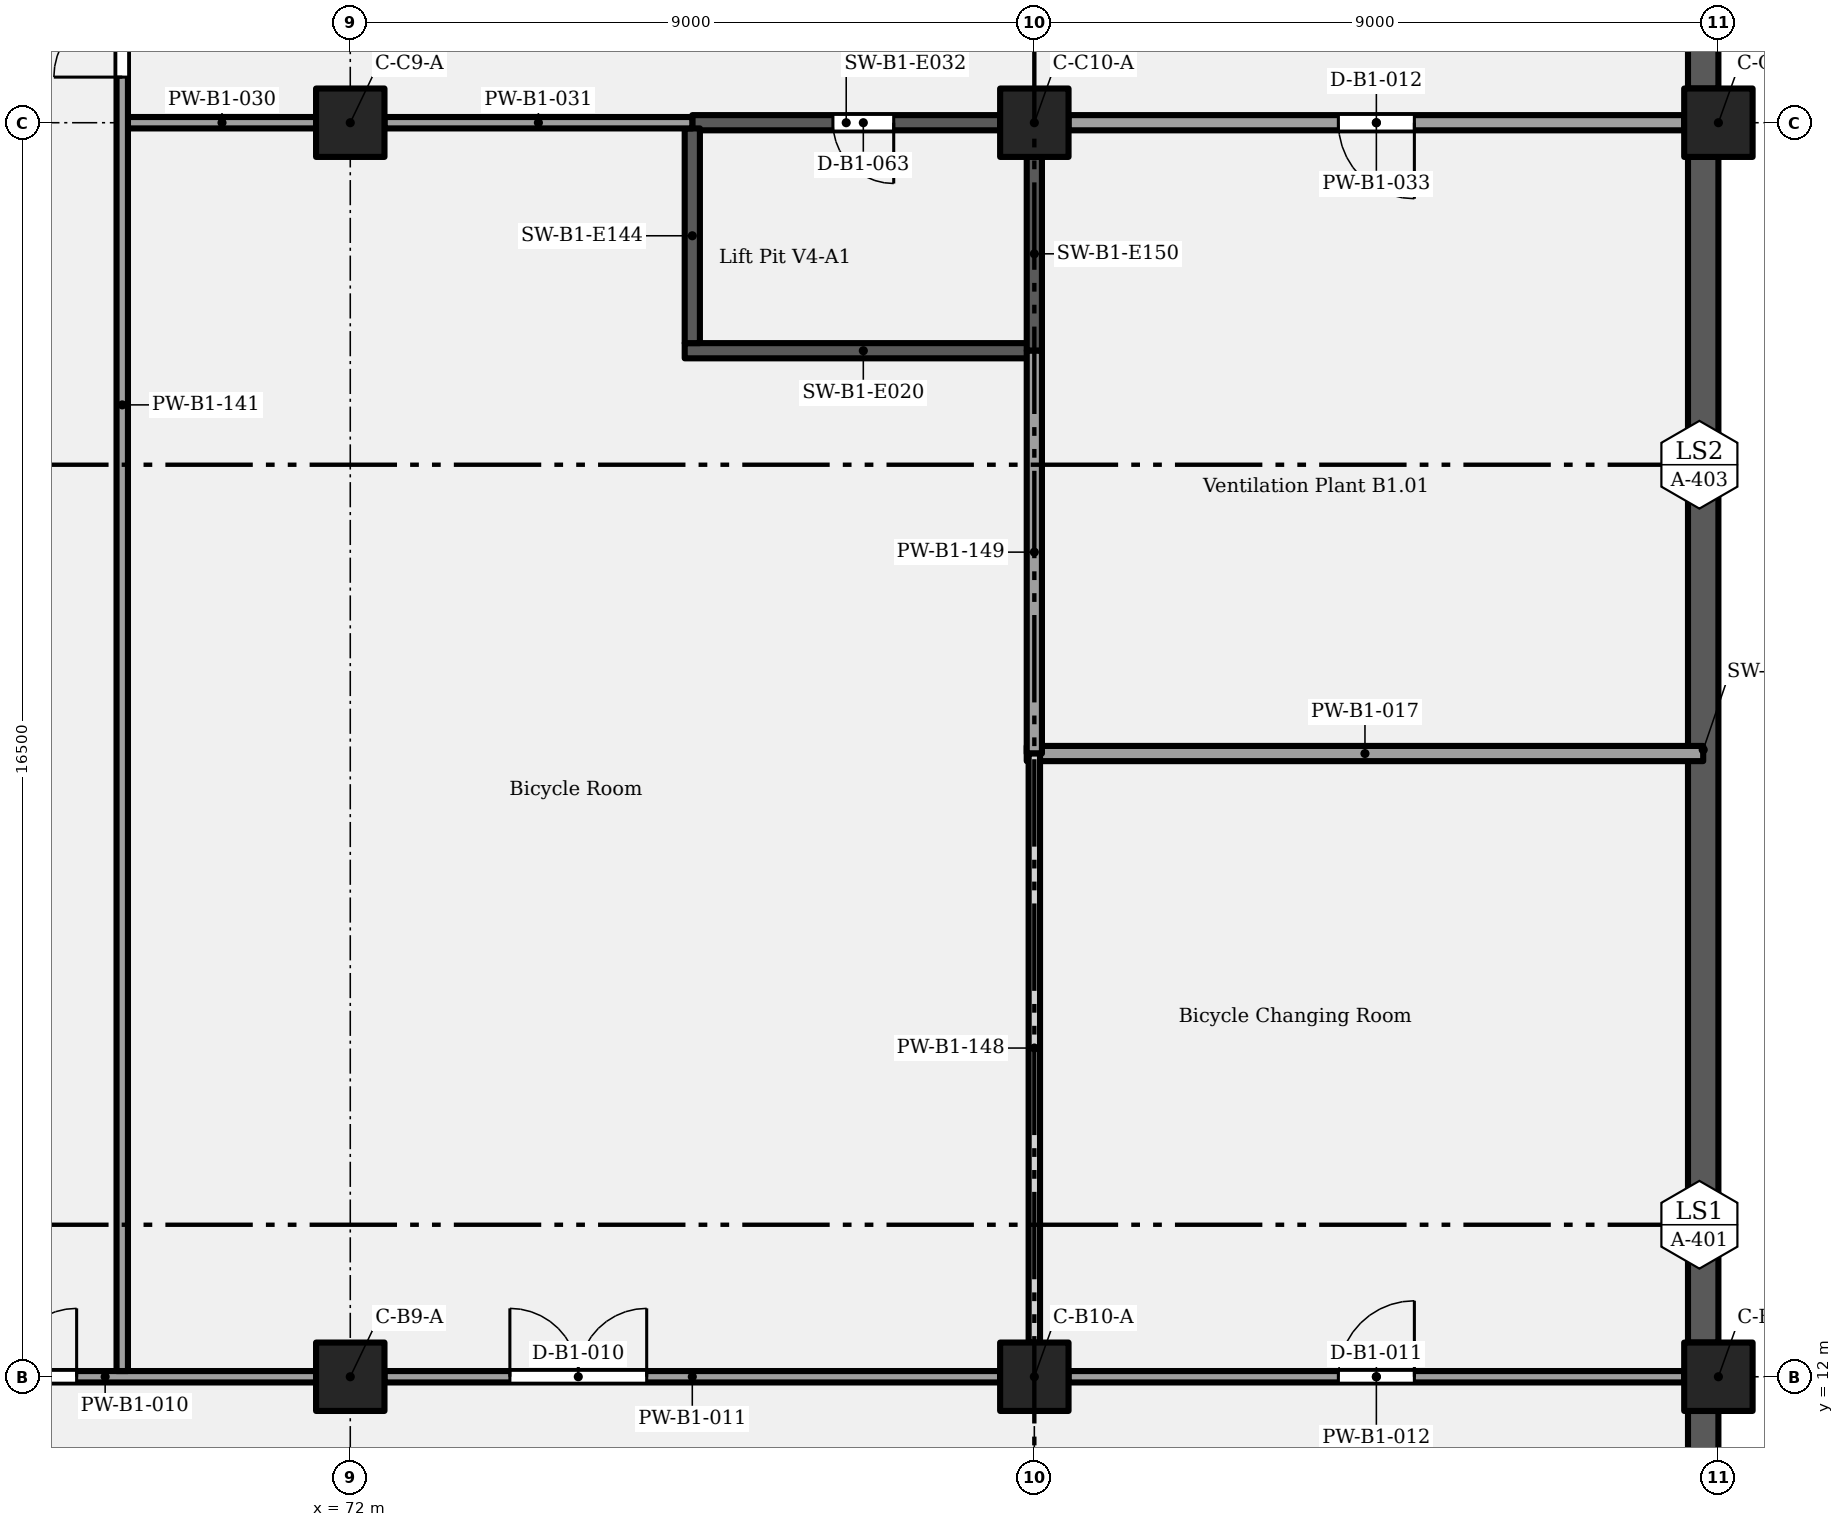
"""IFC4 building model, lengths in metres.
Left out: names, types, materials, properties, quantities, classifications, styles, units other than length and angle.
Written with IfcOpenShell. Run it as: python <this file> out.ifc"""

import sys

from ifc_helpers import new_model, si_unit, direction, frame, frame_2d, origin, origin_2d, place, context, subcontext, project, spatial, rectangle, extrude, element, fill, save


model = new_model("IFC4")
c1 = context("Model", 3, precision=1e-05, world=origin(), true_north=direction((0.0, 1.0)))
c2 = subcontext(c1, "Body", "Model", "MODEL_VIEW")
j1 = project(units=[si_unit("LENGTHUNIT", "METRE"), si_unit("PLANEANGLEUNIT", "RADIAN")], contexts=[c1])
p1 = place(None, origin())
s1 = spatial("IfcSite", under=j1, at=p1, CompositionType="ELEMENT")
p2 = place(p1, origin())
s2 = spatial("IfcBuilding", under=s1, at=p2, CompositionType="ELEMENT")
p3 = place(p2, frame((0.0, 0.0, -4.2)))
s3 = spatial("IfcBuildingStorey", under=s2, at=p3, CompositionType="ELEMENT", Elevation=-4.2)
for number, where, z_axis, x_axis in (
    (1, (72.0, 12.0, 0.0), (0.0, 0.0, 1.0), (1.0, 0.0, 0.0)),
    (2, (81.0, 12.0, 0.0), (0.0, 0.0, 1.0), (1.0, 0.0, 0.0)),
    (3, (90.0, 12.0, 0.0), (0.0, 0.0, 1.0), (1.0, 0.0, 0.0)),
    (4, (72.0, 28.5, 0.0), (0.0, 0.0, 1.0), (1.0, 0.0, 0.0)),
    (5, (81.0, 28.5, 0.0), (0.0, 0.0, 1.0), (1.0, 0.0, 0.0)),
    (6, (90.0, 28.5, 0.0), (0.0, 0.0, 1.0), (1.0, 0.0, 0.0)),
):
    element("IfcColumn", number, at=place(p3, frame(where, z_axis=z_axis, x_axis=x_axis)), inside=s3, PredefinedType="COLUMN", context=c2, shape_type="SweptSolid", body=[
        extrude(rectangle(XDim=0.9, YDim=0.9, at=origin_2d()), origin(), (0.0, 0.0, 1.0), 4.2),
    ])
p4 = place(p3, frame((89.8, 0.45, 0.0), z_axis=(0.0, 0.0, 1.0), x_axis=(0.0, 1.0, 0.0)))
e7 = element("IfcWall", 7, at=p4, inside=s3, PredefinedType="SOLIDWALL", context=c2, shape_type="SweptSolid", body=[
    extrude(rectangle(XDim=11.1, YDim=0.4, at=frame_2d((5.55, 0.0))), origin(), (0.0, 0.0, 1.0), 3.9),
])
p5 = place(p3, frame((89.8, 12.45, 0.0), z_axis=(0.0, 0.0, 1.0), x_axis=(0.0, 1.0, 0.0)))
e8 = element("IfcWall", 8, at=p5, inside=s3, PredefinedType="SOLIDWALL", context=c2, shape_type="SweptSolid", body=[
    extrude(rectangle(XDim=15.6, YDim=0.4, at=frame_2d((7.8, 0.0))), origin(), (0.0, 0.0, 1.0), 3.9),
])
p6 = place(p3, frame((89.8, 28.95, 0.0), z_axis=(0.0, 0.0, 1.0), x_axis=(0.0, 1.0, 0.0)))
e9 = element("IfcWall", 9, at=p6, inside=s3, PredefinedType="SOLIDWALL", context=c2, shape_type="SweptSolid", body=[
    extrude(rectangle(XDim=8.1, YDim=0.4, at=frame_2d((4.05, 0.0))), origin(), (0.0, 0.0, 1.0), 3.9),
])
p7 = place(p3, frame((66.0, 12.0, 0.0), z_axis=(0.0, 0.0, 1.0), x_axis=(1.0, 0.0, 0.0)))
e10 = element("IfcWall", 10, at=p7, inside=s3, PredefinedType="PARTITIONING", context=c2, shape_type="SweptSolid", body=[
    extrude(rectangle(XDim=5.55, YDim=0.15, at=frame_2d((2.775, 0.0))), origin(), (0.0, 0.0, 1.0), 3.15),
])
p8 = place(p7, frame((0.6, 0.0, 0.0)))
e11 = element("IfcOpeningElement", 11, at=p8, cuts=e10, PredefinedType="OPENING", context=c2, shape_type="SweptSolid", body=[
    extrude(rectangle(XDim=1.8, YDim=2.1, at=frame_2d((0.9, 1.05))), frame((0.0, 0.085, 0.0), z_axis=(0.0, -1.0, 0.0), x_axis=(1.0, 0.0, 0.0)), (0.0, 0.0, 1.0), 0.17),
])
p9 = place(p3, frame((72.45, 12.0, 0.0), z_axis=(0.0, 0.0, 1.0), x_axis=(1.0, 0.0, 0.0)))
e12 = element("IfcWall", 12, at=p9, inside=s3, PredefinedType="PARTITIONING", context=c2, shape_type="SweptSolid", body=[
    extrude(rectangle(XDim=8.1, YDim=0.15, at=frame_2d((4.05, 0.0))), origin(), (0.0, 0.0, 1.0), 3.15),
])
p10 = place(p9, frame((1.65, 0.0, 0.0)))
e13 = element("IfcOpeningElement", 13, at=p10, cuts=e12, PredefinedType="OPENING", context=c2, shape_type="SweptSolid", body=[
    extrude(rectangle(XDim=1.8, YDim=2.1, at=frame_2d((0.9, 1.05))), frame((0.0, 0.085, 0.0), z_axis=(0.0, -1.0, 0.0), x_axis=(1.0, 0.0, 0.0)), (0.0, 0.0, 1.0), 0.17),
])
p11 = place(p3, frame((81.45, 12.0, 0.0), z_axis=(0.0, 0.0, 1.0), x_axis=(1.0, 0.0, 0.0)))
e14 = element("IfcWall", 14, at=p11, inside=s3, PredefinedType="PARTITIONING", context=c2, shape_type="SweptSolid", body=[
    extrude(rectangle(XDim=8.1, YDim=0.15, at=frame_2d((4.05, 0.0))), origin(), (0.0, 0.0, 1.0), 3.15),
])
p12 = place(p11, frame((3.55, 0.0, 0.0)))
e15 = element("IfcOpeningElement", 15, at=p12, cuts=e14, PredefinedType="OPENING", context=c2, shape_type="SweptSolid", body=[
    extrude(rectangle(XDim=1.0, YDim=2.1, at=frame_2d((0.5, 1.05))), frame((0.0, 0.085, 0.0), z_axis=(0.0, -1.0, 0.0), x_axis=(1.0, 0.0, 0.0)), (0.0, 0.0, 1.0), 0.17),
])
p13 = place(p3, frame((80.9, 20.2, 0.0), z_axis=(0.0, 0.0, 1.0), x_axis=(1.0, 0.0, 0.0)))
e16 = element("IfcWall", 16, at=p13, inside=s3, PredefinedType="PARTITIONING", context=c2, shape_type="SweptSolid", body=[
    extrude(rectangle(XDim=8.9, YDim=0.2, at=frame_2d((4.45, 0.0))), origin(), (0.0, 0.0, 1.0), 3.9),
])
p14 = place(p3, frame((76.4, 25.5, 0.0), z_axis=(0.0, 0.0, 1.0), x_axis=(1.0, 0.0, 0.0)))
e17 = element("IfcWall", 17, at=p14, inside=s3, PredefinedType="SHEAR", context=c2, shape_type="SweptSolid", body=[
    extrude(rectangle(XDim=4.7, YDim=0.2, at=frame_2d((2.35, 0.0))), origin(), (0.0, 0.0, 1.0), 3.9),
])
p15 = place(p3, frame((69.075, 28.5, 0.0), z_axis=(0.0, 0.0, 1.0), x_axis=(1.0, 0.0, 0.0)))
e18 = element("IfcWall", 18, at=p15, inside=s3, PredefinedType="PARTITIONING", context=c2, shape_type="SweptSolid", body=[
    extrude(rectangle(XDim=2.475, YDim=0.15, at=frame_2d((1.238, 0.0))), origin(), (0.0, 0.0, 1.0), 3.15),
])
p16 = place(p3, frame((72.45, 28.5, 0.0), z_axis=(0.0, 0.0, 1.0), x_axis=(1.0, 0.0, 0.0)))
e19 = element("IfcWall", 19, at=p16, inside=s3, PredefinedType="PARTITIONING", context=c2, shape_type="SweptSolid", body=[
    extrude(rectangle(XDim=4.05, YDim=0.15, at=frame_2d((2.025, 0.0))), origin(), (0.0, 0.0, 1.0), 3.15),
])
p17 = place(p3, frame((76.5, 28.5, 0.0), z_axis=(0.0, 0.0, 1.0), x_axis=(1.0, 0.0, 0.0)))
e20 = element("IfcWall", 20, at=p17, inside=s3, PredefinedType="SHEAR", context=c2, shape_type="SweptSolid", body=[
    extrude(rectangle(XDim=4.05, YDim=0.2, at=frame_2d((2.025, 0.0))), origin(), (0.0, 0.0, 1.0), 3.9),
])
p18 = place(p17, frame((2.65, 0.0, 0.0), z_axis=(0.0, 0.0, 1.0), x_axis=(-1.0, 0.0, 0.0)))
e21 = element("IfcOpeningElement", 21, at=p18, cuts=e20, PredefinedType="OPENING", context=c2, shape_type="SweptSolid", body=[
    extrude(rectangle(XDim=0.8, YDim=2.0, at=frame_2d((0.4, 1.0))), frame((0.0, 0.11, 0.0), z_axis=(0.0, -1.0, 0.0), x_axis=(1.0, 0.0, 0.0)), (0.0, 0.0, 1.0), 0.22),
])
p19 = place(p3, frame((81.45, 28.5, 0.0), z_axis=(0.0, 0.0, 1.0), x_axis=(1.0, 0.0, 0.0)))
e22 = element("IfcWall", 22, at=p19, inside=s3, PredefinedType="PARTITIONING", context=c2, shape_type="SweptSolid", body=[
    extrude(rectangle(XDim=8.1, YDim=0.2, at=frame_2d((4.05, 0.0))), origin(), (0.0, 0.0, 1.0), 3.15),
])
p20 = place(p19, frame((4.55, 0.0, 0.0), z_axis=(0.0, 0.0, 1.0), x_axis=(-1.0, 0.0, 0.0)))
e23 = element("IfcOpeningElement", 23, at=p20, cuts=e22, PredefinedType="OPENING", context=c2, shape_type="SweptSolid", body=[
    extrude(rectangle(XDim=1.0, YDim=2.1, at=frame_2d((0.5, 1.05))), frame((0.0, 0.11, 0.0), z_axis=(0.0, -1.0, 0.0), x_axis=(1.0, 0.0, 0.0)), (0.0, 0.0, 1.0), 0.22),
])
p21 = place(p3, frame((69.0, 12.075, 0.0), z_axis=(0.0, 0.0, 1.0), x_axis=(0.0, 1.0, 0.0)))
e24 = element("IfcWall", 24, at=p21, inside=s3, PredefinedType="PARTITIONING", context=c2, shape_type="SweptSolid", body=[
    extrude(rectangle(XDim=25.425, YDim=0.15, at=frame_2d((12.712, 0.0))), origin(), (0.0, 0.0, 1.0), 3.9),
])
p22 = place(p21, frame((17.025, 0.0, 0.0)))
e25 = element("IfcOpeningElement", 25, at=p22, cuts=e24, PredefinedType="OPENING", context=c2, shape_type="SweptSolid", body=[
    extrude(rectangle(XDim=1.8, YDim=2.1, at=frame_2d((0.9, 1.05))), frame((0.0, 0.085, 0.0), z_axis=(0.0, -1.0, 0.0), x_axis=(1.0, 0.0, 0.0)), (0.0, 0.0, 1.0), 0.17),
])
p23 = place(p3, frame((76.5, 25.6, 0.0), z_axis=(0.0, 0.0, 1.0), x_axis=(0.0, 1.0, 0.0)))
e26 = element("IfcWall", 26, at=p23, inside=s3, PredefinedType="SHEAR", context=c2, shape_type="SweptSolid", body=[
    extrude(rectangle(XDim=2.825, YDim=0.2, at=frame_2d((1.413, 0.0))), origin(), (0.0, 0.0, 1.0), 3.9),
])
p24 = place(p3, frame((81.0, 12.45, 0.0), z_axis=(0.0, 0.0, 1.0), x_axis=(0.0, 1.0, 0.0)))
e27 = element("IfcWall", 27, at=p24, inside=s3, PredefinedType="PARTITIONING", context=c2, shape_type="SweptSolid", body=[
    extrude(rectangle(XDim=7.75, YDim=0.15, at=frame_2d((3.875, 0.0))), origin(), (0.0, 0.0, 1.0), 2.95),
])
p25 = place(p3, frame((81.0, 20.2, 0.0), z_axis=(0.0, 0.0, 1.0), x_axis=(0.0, 1.0, 0.0)))
e28 = element("IfcWall", 28, at=p25, inside=s3, PredefinedType="PARTITIONING", context=c2, shape_type="SweptSolid", body=[
    extrude(rectangle(XDim=5.3, YDim=0.2, at=frame_2d((2.65, 0.0))), origin(), (0.0, 0.0, 1.0), 2.95),
])
p26 = place(p3, frame((81.0, 25.5, 0.0), z_axis=(0.0, 0.0, 1.0), x_axis=(0.0, 1.0, 0.0)))
e29 = element("IfcWall", 29, at=p26, inside=s3, PredefinedType="SHEAR", context=c2, shape_type="SweptSolid", body=[
    extrude(rectangle(XDim=2.55, YDim=0.2, at=frame_2d((1.275, 0.0))), origin(), (0.0, 0.0, 1.0), 3.9),
])
p27 = place(p8, origin())
e30 = element("IfcDoor", 30, at=p27, inside=s3, OperationType="DOUBLE_DOOR_SINGLE_SWING", PredefinedType="DOOR", context=c2, shape_type="SweptSolid", body=[
    extrude(rectangle(XDim=1.8, YDim=2.1, at=frame_2d((0.9, 1.05))), frame((0.0, 0.025, 0.0), z_axis=(0.0, -1.0, 0.0), x_axis=(1.0, 0.0, 0.0)), (0.0, 0.0, 1.0), 0.05),
])
fill(e11, e30)
p28 = place(p22, origin())
e31 = element("IfcDoor", 31, at=p28, inside=s3, OperationType="DOUBLE_DOOR_SINGLE_SWING", PredefinedType="DOOR", context=c2, shape_type="SweptSolid", body=[
    extrude(rectangle(XDim=1.8, YDim=2.1, at=frame_2d((0.9, 1.05))), frame((0.0, 0.025, 0.0), z_axis=(0.0, -1.0, 0.0), x_axis=(1.0, 0.0, 0.0)), (0.0, 0.0, 1.0), 0.05),
])
fill(e25, e31)
p29 = place(p10, origin())
e32 = element("IfcDoor", 32, at=p29, inside=s3, OperationType="DOUBLE_DOOR_SINGLE_SWING", PredefinedType="DOOR", context=c2, shape_type="SweptSolid", body=[
    extrude(rectangle(XDim=1.8, YDim=2.1, at=frame_2d((0.9, 1.05))), frame((0.0, 0.025, 0.0), z_axis=(0.0, -1.0, 0.0), x_axis=(1.0, 0.0, 0.0)), (0.0, 0.0, 1.0), 0.05),
])
fill(e13, e32)
p30 = place(p12, origin())
e33 = element("IfcDoor", 33, at=p30, inside=s3, OperationType="SINGLE_SWING_RIGHT", PredefinedType="DOOR", context=c2, shape_type="SweptSolid", body=[
    extrude(rectangle(XDim=1.0, YDim=2.1, at=frame_2d((0.5, 1.05))), frame((0.0, 0.025, 0.0), z_axis=(0.0, -1.0, 0.0), x_axis=(1.0, 0.0, 0.0)), (0.0, 0.0, 1.0), 0.05),
])
fill(e15, e33)
p31 = place(p20, origin())
e34 = element("IfcDoor", 34, at=p31, inside=s3, OperationType="SINGLE_SWING_LEFT", PredefinedType="DOOR", context=c2, shape_type="SweptSolid", body=[
    extrude(rectangle(XDim=1.0, YDim=2.1, at=frame_2d((0.5, 1.05))), frame((0.0, 0.025, 0.0), z_axis=(0.0, -1.0, 0.0), x_axis=(1.0, 0.0, 0.0)), (0.0, 0.0, 1.0), 0.05),
])
fill(e23, e34)
p32 = place(p18, origin())
e35 = element("IfcDoor", 35, at=p32, inside=s3, OperationType="SINGLE_SWING_LEFT", PredefinedType="DOOR", context=c2, shape_type="SweptSolid", body=[
    extrude(rectangle(XDim=0.8, YDim=2.0, at=frame_2d((0.4, 1.0))), frame((0.0, 0.025, 0.0), z_axis=(0.0, -1.0, 0.0), x_axis=(1.0, 0.0, 0.0)), (0.0, 0.0, 1.0), 0.05),
])
fill(e21, e35)
save(model, sys.argv[1])
